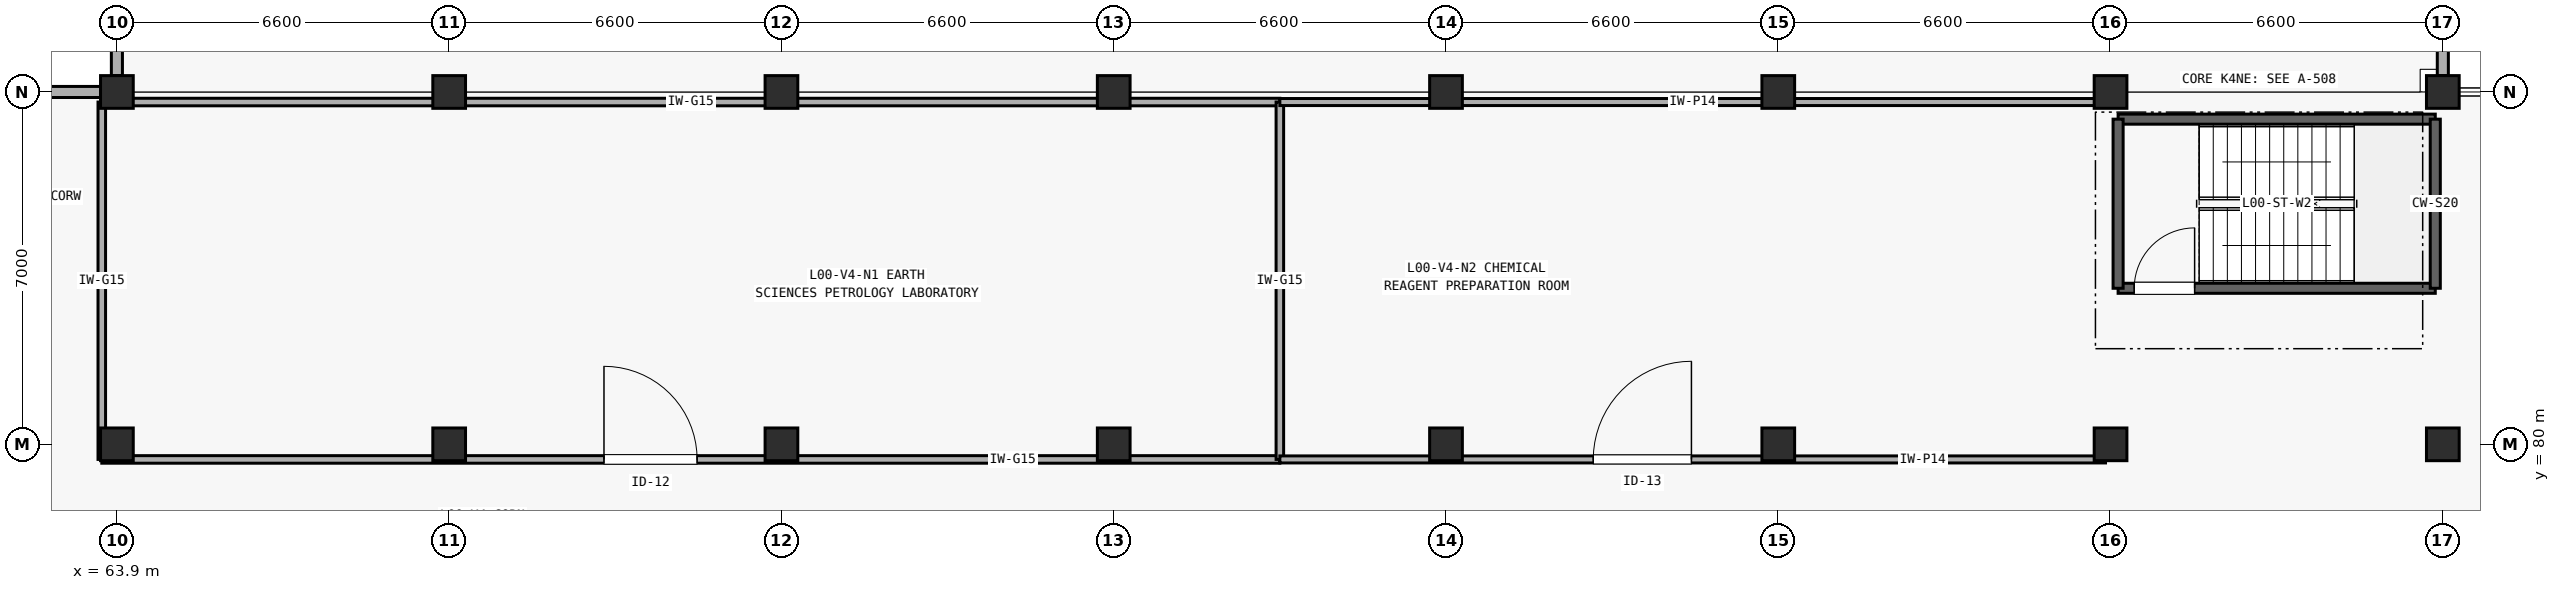
"""IFC4 building model, lengths in metres.
Left out: names, types, materials, properties, quantities, classifications, styles, units other than length and angle.
Written with IfcOpenShell. Run it as: python <this file> out.ifc"""

import sys

from ifc_helpers import new_model, si_unit, direction, frame, frame_2d, origin, origin_2d, place, context, subcontext, project, spatial, rectangle, extrude, element, fill, save


model = new_model("IFC4")
c1 = context("Model", 3, precision=1e-05, world=origin(), true_north=direction((0.0, 1.0)))
c2 = subcontext(c1, "Body", "Model", "MODEL_VIEW")
j1 = project(units=[si_unit("LENGTHUNIT", "METRE"), si_unit("PLANEANGLEUNIT", "RADIAN")], contexts=[c1])
p1 = place(None, origin())
s1 = spatial("IfcSite", under=j1, at=p1, CompositionType="ELEMENT")
p2 = place(p1, origin())
s2 = spatial("IfcBuilding", under=s1, at=p2, CompositionType="ELEMENT")
p3 = place(p2, origin())
s3 = spatial("IfcBuildingStorey", under=s2, at=p3, CompositionType="ELEMENT", Elevation=0.0)
for number, where, z_axis, x_axis in (
    (1, (63.9, 80.0, 0.0), (0.0, 0.0, 1.0), (1.0, 0.0, 0.0)),
    (2, (63.9, 87.0, 0.0), (0.0, 0.0, 1.0), (1.0, 0.0, 0.0)),
    (3, (70.5, 80.0, 0.0), (0.0, 0.0, 1.0), (1.0, 0.0, 0.0)),
    (4, (70.5, 87.0, 0.0), (0.0, 0.0, 1.0), (1.0, 0.0, 0.0)),
    (5, (77.1, 80.0, 0.0), (0.0, 0.0, 1.0), (1.0, 0.0, 0.0)),
    (6, (77.1, 87.0, 0.0), (0.0, 0.0, 1.0), (1.0, 0.0, 0.0)),
    (7, (83.7, 80.0, 0.0), (0.0, 0.0, 1.0), (1.0, 0.0, 0.0)),
    (8, (83.7, 87.0, 0.0), (0.0, 0.0, 1.0), (1.0, 0.0, 0.0)),
    (9, (90.3, 80.0, 0.0), (0.0, 0.0, 1.0), (1.0, 0.0, 0.0)),
    (10, (90.3, 87.0, 0.0), (0.0, 0.0, 1.0), (1.0, 0.0, 0.0)),
    (11, (96.9, 80.0, 0.0), (0.0, 0.0, 1.0), (1.0, 0.0, 0.0)),
    (12, (96.9, 87.0, 0.0), (0.0, 0.0, 1.0), (1.0, 0.0, 0.0)),
    (13, (103.5, 80.0, 0.0), (0.0, 0.0, 1.0), (1.0, 0.0, 0.0)),
    (14, (103.5, 87.0, 0.0), (0.0, 0.0, 1.0), (1.0, 0.0, 0.0)),
    (15, (110.1, 80.0, 0.0), (0.0, 0.0, 1.0), (1.0, 0.0, 0.0)),
    (16, (110.1, 87.0, 0.0), (0.0, 0.0, 1.0), (1.0, 0.0, 0.0)),
):
    element("IfcColumn", number, at=place(p3, frame(where, z_axis=z_axis, x_axis=x_axis)), inside=s3, PredefinedType="COLUMN", context=c2, shape_type="SweptSolid", body=[
        extrude(rectangle(XDim=0.65, YDim=0.65, at=origin_2d()), origin(), (0.0, 0.0, 1.0), 4.2),
    ])
p4 = place(p3, frame((57.625, 87.0, 0.0), z_axis=(0.0, 0.0, 1.0), x_axis=(1.0, 0.0, 0.0)))
e17 = element("IfcWall", 17, at=p4, inside=s3, PredefinedType="SOLIDWALL", context=c2, shape_type="SweptSolid", body=[
    extrude(rectangle(XDim=5.95, YDim=0.22, at=frame_2d((2.975, 0.0))), origin(), (0.0, 0.0, 1.0), 3.385),
])
p5 = place(p4, frame((2.075, 0.0, 0.85)))
e18 = element("IfcOpeningElement", 18, at=p5, cuts=e17, PredefinedType="OPENING", context=c2, shape_type="SweptSolid", body=[
    extrude(rectangle(XDim=1.8, YDim=1.35, at=frame_2d((0.9, 0.675))), frame((0.0, 0.12, 0.0), z_axis=(0.0, -1.0, 0.0), x_axis=(1.0, 0.0, 0.0)), (0.0, 0.0, 1.0), 0.24),
])
p6 = place(p3, frame((63.9, 87.325, 0.0), z_axis=(0.0, 0.0, 1.0), x_axis=(0.0, 1.0, 0.0)))
e19 = element("IfcWall", 19, at=p6, inside=s3, PredefinedType="SOLIDWALL", context=c2, shape_type="SweptSolid", body=[
    extrude(rectangle(XDim=6.35, YDim=0.22, at=frame_2d((3.175, 0.0))), origin(), (0.0, 0.0, 1.0), 3.465),
])
p7 = place(p6, frame((2.125, 0.0, 0.85)))
e20 = element("IfcOpeningElement", 20, at=p7, cuts=e19, PredefinedType="OPENING", context=c2, shape_type="SweptSolid", body=[
    extrude(rectangle(XDim=2.1, YDim=1.5, at=frame_2d((1.05, 0.75))), frame((0.0, 0.12, 0.0), z_axis=(0.0, -1.0, 0.0), x_axis=(1.0, 0.0, 0.0)), (0.0, 0.0, 1.0), 0.24),
])
p8 = place(p3, frame((110.1, 87.325, 0.0), z_axis=(0.0, 0.0, 1.0), x_axis=(0.0, 1.0, 0.0)))
e21 = element("IfcWall", 21, at=p8, inside=s3, PredefinedType="SOLIDWALL", context=c2, shape_type="SweptSolid", body=[
    extrude(rectangle(XDim=6.35, YDim=0.22, at=frame_2d((3.175, 0.0))), origin(), (0.0, 0.0, 1.0), 3.565),
])
p9 = place(p8, frame((1.925, 0.0, 0.85)))
e22 = element("IfcOpeningElement", 22, at=p9, cuts=e21, PredefinedType="OPENING", context=c2, shape_type="SweptSolid", body=[
    extrude(rectangle(XDim=2.5, YDim=1.25, at=frame_2d((1.25, 0.625))), frame((0.0, 0.12, 0.0), z_axis=(0.0, -1.0, 0.0), x_axis=(1.0, 0.0, 0.0)), (0.0, 0.0, 1.0), 0.24),
])
p10 = place(p3, frame((103.65, 83.1, 0.0), z_axis=(0.0, 0.0, 1.0), x_axis=(1.0, 0.0, 0.0)))
e23 = element("IfcWall", 23, at=p10, inside=s3, PredefinedType="SHEAR", context=c2, shape_type="SweptSolid", body=[
    extrude(rectangle(XDim=6.3, YDim=0.2, at=frame_2d((3.15, 0.0))), origin(), (0.0, 0.0, 1.0), 4.2),
])
p11 = place(p10, frame((0.32, 0.0, 0.0)))
e24 = element("IfcOpeningElement", 24, at=p11, cuts=e23, PredefinedType="OPENING", context=c2, shape_type="SweptSolid", body=[
    extrude(rectangle(XDim=1.2, YDim=2.15, at=frame_2d((0.6, 1.075))), frame((0.0, 0.11, 0.0), z_axis=(0.0, -1.0, 0.0), x_axis=(1.0, 0.0, 0.0)), (0.0, 0.0, 1.0), 0.22),
])
p12 = place(p3, frame((103.65, 86.46, 0.0), z_axis=(0.0, 0.0, 1.0), x_axis=(1.0, 0.0, 0.0)))
e25 = element("IfcWall", 25, at=p12, inside=s3, PredefinedType="SHEAR", context=c2, shape_type="SweptSolid", body=[
    extrude(rectangle(XDim=6.3, YDim=0.2, at=frame_2d((3.15, 0.0))), origin(), (0.0, 0.0, 1.0), 4.2),
])
for number, where, z_axis, x_axis in (
    (26, (103.65, 83.1, 0.0), (0.0, 0.0, 1.0), (0.0, 1.0, 0.0)),
    (27, (109.95, 83.1, 0.0), (0.0, 0.0, 1.0), (0.0, 1.0, 0.0)),
):
    element("IfcWall", number, at=place(p3, frame(where, z_axis=z_axis, x_axis=x_axis)), inside=s3, PredefinedType="SHEAR", context=c2, shape_type="SweptSolid", body=[
        extrude(rectangle(XDim=3.36, YDim=0.2, at=frame_2d((1.68, 0.0))), origin(), (0.0, 0.0, 1.0), 4.2),
    ])
p13 = place(p3, frame((63.6, 79.7, 0.0), z_axis=(0.0, 0.0, 1.0), x_axis=(1.0, 0.0, 0.0)))
e28 = element("IfcWall", 28, at=p13, inside=s3, PredefinedType="PARTITIONING", context=c2, shape_type="SweptSolid", body=[
    extrude(rectangle(XDim=23.4, YDim=0.15, at=frame_2d((11.7, 0.0))), origin(), (0.0, 0.0, 1.0), 3.135),
])
p14 = place(p13, frame((9.975, 0.0, 0.0)))
e29 = element("IfcOpeningElement", 29, at=p14, cuts=e28, PredefinedType="OPENING", context=c2, shape_type="SweptSolid", body=[
    extrude(rectangle(XDim=1.85, YDim=2.3, at=frame_2d((0.925, 1.15))), frame((0.0, 0.085, 0.0), z_axis=(0.0, -1.0, 0.0), x_axis=(1.0, 0.0, 0.0)), (0.0, 0.0, 1.0), 0.17),
])
p15 = place(p3, frame((63.6, 86.8, 0.0), z_axis=(0.0, 0.0, 1.0), x_axis=(1.0, 0.0, 0.0)))
e30 = element("IfcWall", 30, at=p15, inside=s3, PredefinedType="PARTITIONING", context=c2, shape_type="SweptSolid", body=[
    extrude(rectangle(XDim=23.4, YDim=0.15, at=frame_2d((11.7, 0.0))), origin(), (0.0, 0.0, 1.0), 3.135),
])
p16 = place(p3, frame((63.6, 79.7, 0.0), z_axis=(0.0, 0.0, 1.0), x_axis=(0.0, 1.0, 0.0)))
e31 = element("IfcWall", 31, at=p16, inside=s3, PredefinedType="PARTITIONING", context=c2, shape_type="SweptSolid", body=[
    extrude(rectangle(XDim=7.1, YDim=0.15, at=frame_2d((3.55, 0.0))), origin(), (0.0, 0.0, 1.0), 3.405),
])
p17 = place(p3, frame((87.0, 79.7, 0.0), z_axis=(0.0, 0.0, 1.0), x_axis=(0.0, 1.0, 0.0)))
e32 = element("IfcWall", 32, at=p17, inside=s3, PredefinedType="PARTITIONING", context=c2, shape_type="SweptSolid", body=[
    extrude(rectangle(XDim=7.1, YDim=0.15, at=frame_2d((3.55, 0.0))), origin(), (0.0, 0.0, 1.0), 3.646),
])
p18 = place(p3, frame((87.0, 79.7, 0.0), z_axis=(0.0, 0.0, 1.0), x_axis=(1.0, 0.0, 0.0)))
e33 = element("IfcWall", 33, at=p18, inside=s3, PredefinedType="PLUMBINGWALL", context=c2, shape_type="SweptSolid", body=[
    extrude(rectangle(XDim=16.4, YDim=0.14, at=frame_2d((8.2, 0.0))), origin(), (0.0, 0.0, 1.0), 3.235),
])
p19 = place(p18, frame((6.225, 0.0, 0.0)))
e34 = element("IfcOpeningElement", 34, at=p19, cuts=e33, PredefinedType="OPENING", context=c2, shape_type="SweptSolid", body=[
    extrude(rectangle(XDim=1.95, YDim=2.3, at=frame_2d((0.975, 1.15))), frame((0.0, 0.08, 0.0), z_axis=(0.0, -1.0, 0.0), x_axis=(1.0, 0.0, 0.0)), (0.0, 0.0, 1.0), 0.16),
])
p20 = place(p3, frame((87.0, 86.8, 0.0), z_axis=(0.0, 0.0, 1.0), x_axis=(1.0, 0.0, 0.0)))
e35 = element("IfcWall", 35, at=p20, inside=s3, PredefinedType="PLUMBINGWALL", context=c2, shape_type="SweptSolid", body=[
    extrude(rectangle(XDim=16.4, YDim=0.14, at=frame_2d((8.2, 0.0))), origin(), (0.0, 0.0, 1.0), 3.235),
])
p21 = place(p11, origin())
e36 = element("IfcDoor", 36, at=p21, inside=s3, OperationType="SINGLE_SWING_RIGHT", PredefinedType="DOOR", context=c2, shape_type="SweptSolid", body=[
    extrude(rectangle(XDim=1.2, YDim=2.15, at=frame_2d((0.6, 1.075))), frame((0.0, 0.025, 0.0), z_axis=(0.0, -1.0, 0.0), x_axis=(1.0, 0.0, 0.0)), (0.0, 0.0, 1.0), 0.05),
])
fill(e24, e36)
p22 = place(p14, origin())
e37 = element("IfcDoor", 37, at=p22, inside=s3, OperationType="SINGLE_SWING_LEFT", PredefinedType="DOOR", context=c2, shape_type="SweptSolid", body=[
    extrude(rectangle(XDim=1.85, YDim=2.3, at=frame_2d((0.925, 1.15))), frame((0.0, 0.025, 0.0), z_axis=(0.0, -1.0, 0.0), x_axis=(1.0, 0.0, 0.0)), (0.0, 0.0, 1.0), 0.05),
])
fill(e29, e37)
p23 = place(p19, origin())
e38 = element("IfcDoor", 38, at=p23, inside=s3, OperationType="SINGLE_SWING_RIGHT", PredefinedType="DOOR", context=c2, shape_type="SweptSolid", body=[
    extrude(rectangle(XDim=1.95, YDim=2.3, at=frame_2d((0.975, 1.15))), frame((0.0, 0.025, 0.0), z_axis=(0.0, -1.0, 0.0), x_axis=(1.0, 0.0, 0.0)), (0.0, 0.0, 1.0), 0.05),
])
fill(e34, e38)
save(model, sys.argv[1])
